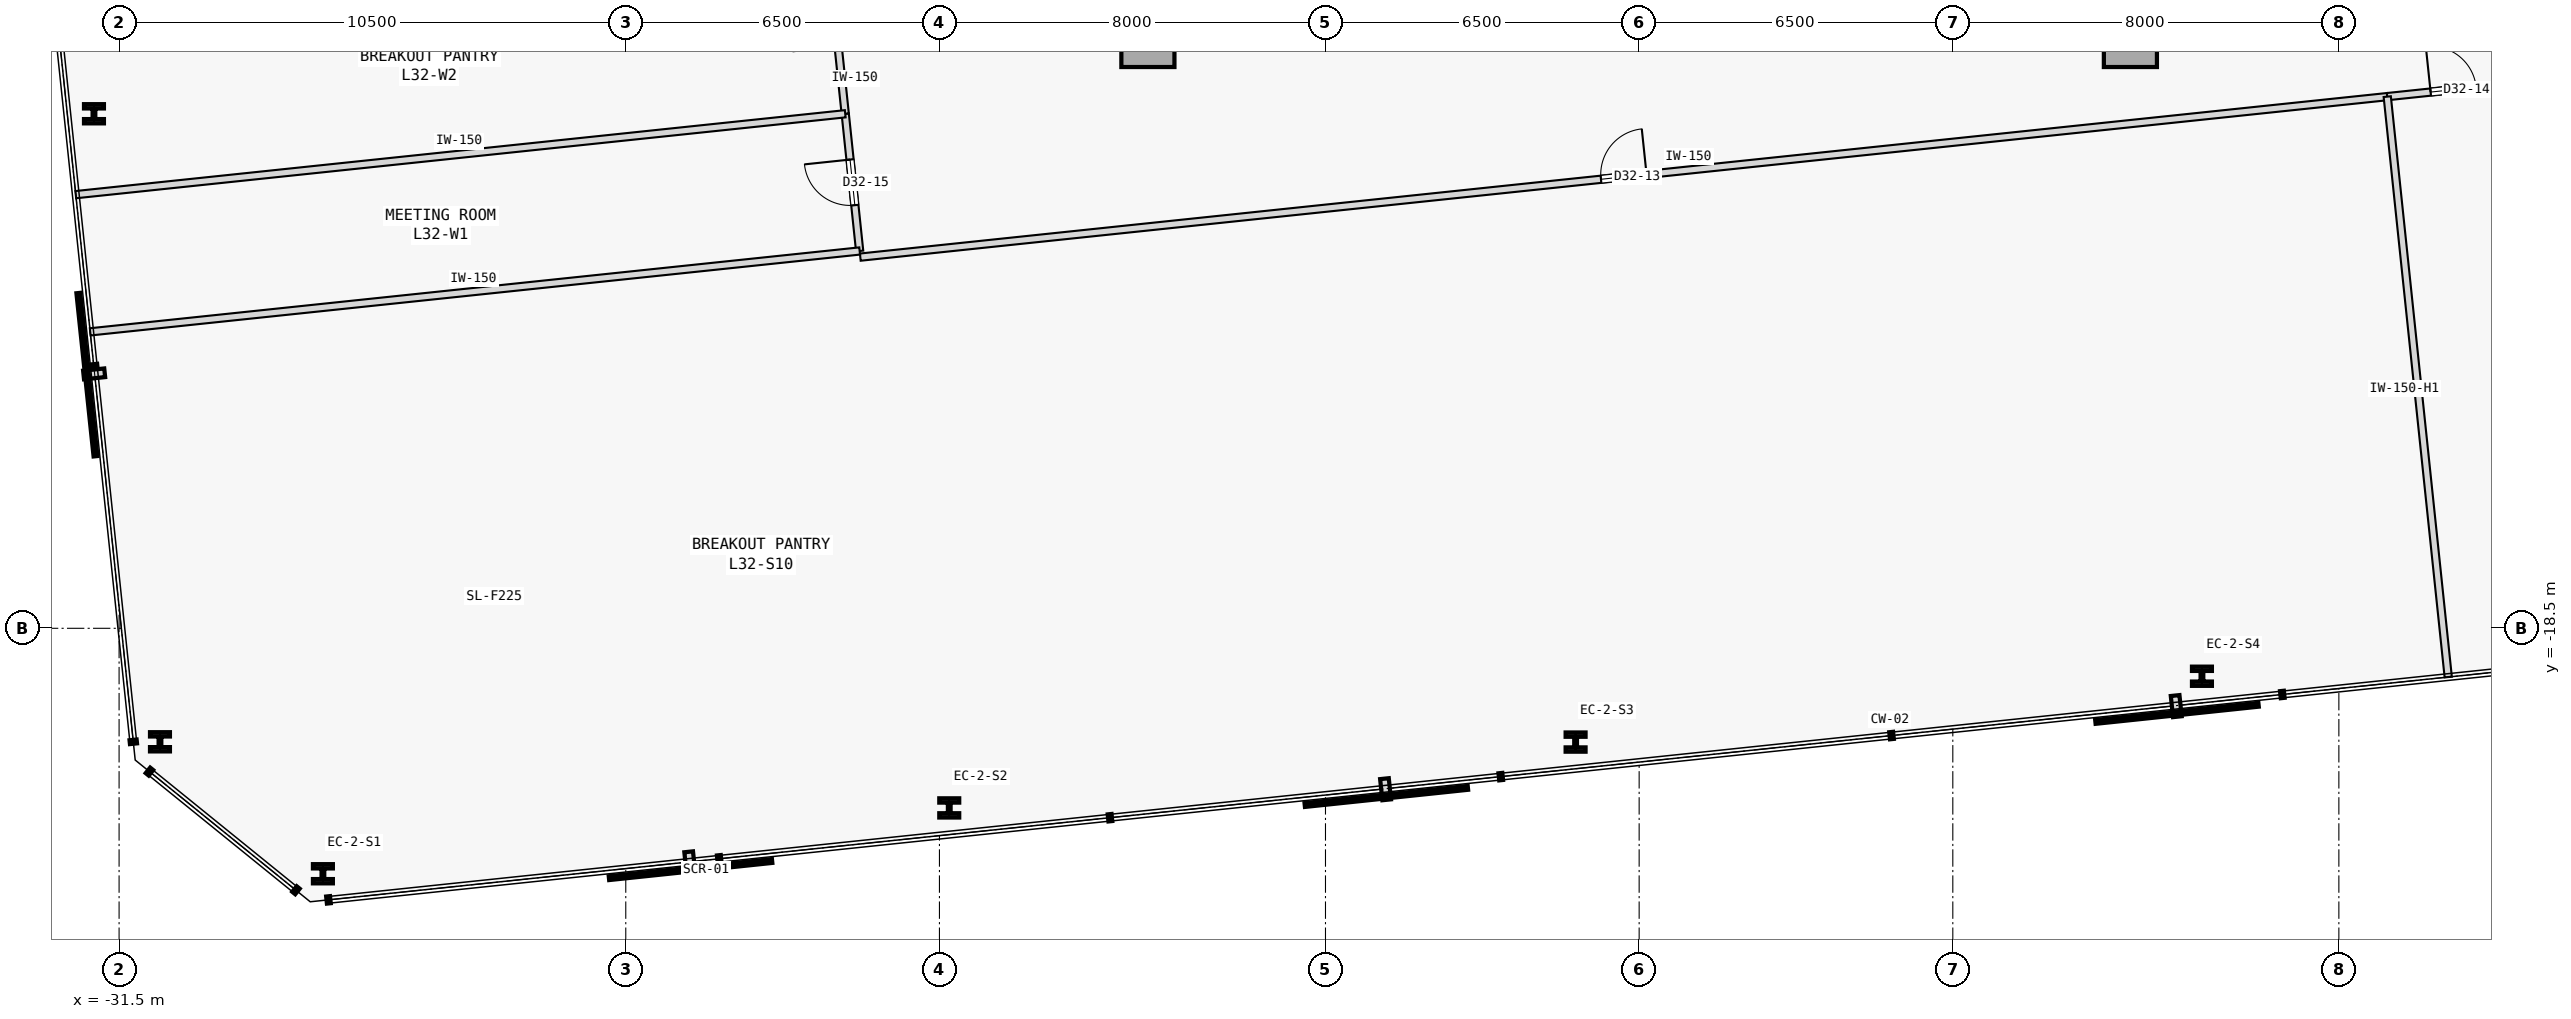
"""IFC4 building model, lengths in metres.
Left out: names, types, materials, properties, quantities, classifications, styles, units other than length and angle.
Written with IfcOpenShell. Run it as: python <this file> out.ifc"""

import sys

from ifc_helpers import new_model, si_unit, direction, frame, frame_2d, origin, origin_2d, place, context, subcontext, project, spatial, rectangle, i_section, extrude, element, fill, save


model = new_model("IFC4")
c1 = context("Model", 3, precision=1e-05, world=origin(), true_north=direction((0.0, 1.0)))
c2 = subcontext(c1, "Body", "Model", "MODEL_VIEW")
j1 = project(units=[si_unit("LENGTHUNIT", "METRE"), si_unit("PLANEANGLEUNIT", "RADIAN")], contexts=[c1])
p1 = place(None, origin())
s1 = spatial("IfcSite", under=j1, at=p1, CompositionType="ELEMENT")
p2 = place(p1, origin())
s2 = spatial("IfcBuilding", under=s1, at=p2, CompositionType="ELEMENT")
p3 = place(p2, frame((0.0, 0.0, 128.1)))
s3 = spatial("IfcBuildingStorey", under=s2, at=p3, CompositionType="ELEMENT", Elevation=128.1)
for number, where, z_axis, x_axis in (
    (1, (-10.18, -6.32, 0.0), (0.0, 0.0, 1.0), (1.0, 0.0, 0.0)),
    (2, (10.18, -6.32, 0.0), (0.0, 0.0, 1.0), (1.0, 0.0, 0.0)),
):
    element("IfcColumn", number, at=place(p3, frame(where, z_axis=z_axis, x_axis=x_axis)), inside=s3, PredefinedType="COLUMN", context=c2, shape_type="SweptSolid", body=[
        extrude(rectangle(XDim=1.1, YDim=1.1, at=origin_2d()), origin(), (0.0, 0.0, 1.0), 3.7),
    ])
for number, where, z_axis, x_axis in (
    (3, (-27.276, -23.586, 0.0), (0.0, 0.0, 1.0), (1.0, 0.0, 0.0)),
    (4, (-14.297, -22.222, 0.0), (0.0, 0.0, 1.0), (1.0, 0.0, 0.0)),
    (5, (-1.317, -20.858, 0.0), (0.0, 0.0, 1.0), (1.0, 0.0, 0.0)),
    (6, (11.663, -19.494, 0.0), (0.0, 0.0, 1.0), (1.0, 0.0, 0.0)),
    (7, (-32.021, -7.838, 0.0), (0.0, 0.0, 1.0), (1.0, 0.0, 0.0)),
    (8, (-30.653, -20.852, 0.0), (0.0, 0.0, 1.0), (1.0, 0.0, 0.0)),
):
    element("IfcColumn", number, at=place(p3, frame(where, z_axis=z_axis, x_axis=x_axis)), inside=s3, PredefinedType="COLUMN", context=c2, shape_type="SweptSolid", body=[
        extrude(i_section(OverallWidth=0.413, OverallDepth=0.398, WebThickness=0.056, FlangeThickness=0.089, FilletRadius=0.015, at=origin_2d()), origin(), (0.0, 0.0, 1.0), 3.7),
    ])
p4 = place(p3, frame((-16.14, -10.809, 0.0), z_axis=(0.0, 0.0, 1.0), x_axis=(0.994522174335, 0.104525809046, 0.0)))
e9 = element("IfcWall", 9, at=p4, inside=s3, PredefinedType="PARTITIONING", context=c2, shape_type="SweptSolid", body=[
    extrude(rectangle(XDim=31.817, YDim=0.15, at=frame_2d((15.908, 0.0))), origin(), (0.0, 0.0, 1.0), 3.475),
])
p5 = place(p4, frame((15.434, 0.0, 0.0)))
e10 = element("IfcOpeningElement", 10, at=p5, cuts=e9, PredefinedType="OPENING", context=c2, shape_type="SweptSolid", body=[
    extrude(rectangle(XDim=0.95, YDim=2.15, at=frame_2d((0.475, 1.075))), frame((0.0, 0.085, 0.0), z_axis=(0.0, -1.0, 0.0), x_axis=(1.0, 0.0, 0.0)), (0.0, 0.0, 1.0), 0.17),
])
p6 = place(p3, frame((15.503, -7.483, 0.0), z_axis=(0.0, 0.0, 1.0), x_axis=(0.994525813133, 0.104491181506, 0.0)))
e11 = element("IfcWall", 11, at=p6, inside=s3, PredefinedType="PARTITIONING", context=c2, shape_type="SweptSolid", body=[
    extrude(rectangle(XDim=2.757, YDim=0.15, at=frame_2d((1.378, 0.0))), origin(), (0.0, 0.0, 1.0), 3.475),
])
p7 = place(p6, frame((0.904, 0.0, 0.0)))
e12 = element("IfcOpeningElement", 12, at=p7, cuts=e11, PredefinedType="OPENING", context=c2, shape_type="SweptSolid", body=[
    extrude(rectangle(XDim=0.95, YDim=2.15, at=frame_2d((0.475, 1.075))), frame((0.0, 0.085, 0.0), z_axis=(0.0, -1.0, 0.0), x_axis=(1.0, 0.0, 0.0)), (0.0, 0.0, 1.0), 0.17),
])
p8 = place(p3, frame((-16.153, -10.682, 0.0), z_axis=(0.0, 0.0, 1.0), x_axis=(-0.104600331874, 0.994514339048, 0.0)))
e13 = element("IfcWall", 13, at=p8, inside=s3, PredefinedType="PARTITIONING", context=c2, shape_type="SweptSolid", body=[
    extrude(rectangle(XDim=2.859, YDim=0.15, at=frame_2d((1.43, 0.0))), origin(), (0.0, 0.0, 1.0), 3.475),
])
p9 = place(p8, frame((0.955, 0.0, 0.0)))
e14 = element("IfcOpeningElement", 14, at=p9, cuts=e13, PredefinedType="OPENING", context=c2, shape_type="SweptSolid", body=[
    extrude(rectangle(XDim=0.95, YDim=2.15, at=frame_2d((0.475, 1.075))), frame((0.0, 0.085, 0.0), z_axis=(0.0, -1.0, 0.0), x_axis=(1.0, 0.0, 0.0)), (0.0, 0.0, 1.0), 0.17),
])
p10 = place(p3, frame((-16.452, -7.838, 0.0), z_axis=(0.0, 0.0, 1.0), x_axis=(-0.104481590513, 0.994526820777, 0.0)))
e15 = element("IfcWall", 15, at=p10, inside=s3, PredefinedType="PARTITIONING", context=c2, shape_type="SweptSolid", body=[
    extrude(rectangle(XDim=3.753, YDim=0.15, at=frame_2d((1.876, 0.0))), origin(), (0.0, 0.0, 1.0), 3.475),
])
p11 = place(p10, frame((1.402, 0.0, 0.0)))
e16 = element("IfcOpeningElement", 16, at=p11, cuts=e15, PredefinedType="OPENING", context=c2, shape_type="SweptSolid", body=[
    extrude(rectangle(XDim=0.95, YDim=2.15, at=frame_2d((0.475, 1.075))), frame((0.0, 0.085, 0.0), z_axis=(0.0, -1.0, 0.0), x_axis=(1.0, 0.0, 0.0)), (0.0, 0.0, 1.0), 0.17),
])
p12 = place(p3, frame((18.231, -7.068, 0.0), z_axis=(0.0, 0.0, 1.0), x_axis=(-0.104536082083, 0.994521094569, 0.0)))
e17 = element("IfcWall", 17, at=p12, inside=s3, PredefinedType="PARTITIONING", context=c2, shape_type="SweptSolid", body=[
    extrude(rectangle(XDim=11.794, YDim=0.15, at=frame_2d((5.897, 0.0))), origin(), (0.0, 0.0, 1.0), 3.475),
])
p13 = place(p12, frame((5.422, 0.0, 0.0)))
e18 = element("IfcOpeningElement", 18, at=p13, cuts=e17, PredefinedType="OPENING", context=c2, shape_type="SweptSolid", body=[
    extrude(rectangle(XDim=0.95, YDim=2.15, at=frame_2d((0.475, 1.075))), frame((0.0, 0.085, 0.0), z_axis=(0.0, -1.0, 0.0), x_axis=(1.0, 0.0, 0.0)), (0.0, 0.0, 1.0), 0.17),
])
p14 = place(p3, frame((16.767, -19.51, 0.0), z_axis=(0.0, 0.0, 1.0), x_axis=(-0.104517685722, 0.994523028075, 0.0)))
e19 = element("IfcWall", 19, at=p14, inside=s3, PredefinedType="PARTITIONING", context=c2, shape_type="SweptSolid", body=[
    extrude(rectangle(XDim=12.093, YDim=0.15, at=frame_2d((6.046, 0.0))), origin(), (0.0, 0.0, 1.0), 3.025),
])
p15 = place(p3, frame((-32.099, -12.358, 0.0), z_axis=(0.0, 0.0, 1.0), x_axis=(0.994522794159, 0.104519911488, 0.0)))
e20 = element("IfcWall", 20, at=p15, inside=s3, PredefinedType="PARTITIONING", context=c2, shape_type="SweptSolid", body=[
    extrude(rectangle(XDim=16.033, YDim=0.15, at=frame_2d((8.017, 0.0))), origin(), (0.0, 0.0, 1.0), 3.475),
])
p16 = place(p3, frame((-32.397, -9.514, 0.0), z_axis=(0.0, 0.0, 1.0), x_axis=(0.994521044813, 0.104536555445, 0.0)))
e21 = element("IfcWall", 21, at=p16, inside=s3, PredefinedType="PARTITIONING", context=c2, shape_type="SweptSolid", body=[
    extrude(rectangle(XDim=16.033, YDim=0.15, at=frame_2d((8.017, 0.0))), origin(), (0.0, 0.0, 1.0), 3.475),
])
p17 = place(p5, origin())
e22 = element("IfcDoor", 22, at=p17, inside=s3, OperationType="SINGLE_SWING_RIGHT", PredefinedType="DOOR", context=c2, shape_type="SweptSolid", body=[
    extrude(rectangle(XDim=0.95, YDim=2.15, at=frame_2d((0.475, 1.075))), frame((0.0, 0.025, 0.0), z_axis=(0.0, -1.0, 0.0), x_axis=(1.0, 0.0, 0.0)), (0.0, 0.0, 1.0), 0.05),
])
fill(e10, e22)
p18 = place(p7, origin())
e23 = element("IfcDoor", 23, at=p18, inside=s3, OperationType="SINGLE_SWING_LEFT", PredefinedType="DOOR", context=c2, shape_type="SweptSolid", body=[
    extrude(rectangle(XDim=0.95, YDim=2.15, at=frame_2d((0.475, 1.075))), frame((0.0, 0.025, 0.0), z_axis=(0.0, -1.0, 0.0), x_axis=(1.0, 0.0, 0.0)), (0.0, 0.0, 1.0), 0.05),
])
fill(e12, e23)
p19 = place(p9, origin())
e24 = element("IfcDoor", 24, at=p19, inside=s3, OperationType="SINGLE_SWING_RIGHT", PredefinedType="DOOR", context=c2, shape_type="SweptSolid", body=[
    extrude(rectangle(XDim=0.95, YDim=2.15, at=frame_2d((0.475, 1.075))), frame((0.0, 0.025, 0.0), z_axis=(0.0, -1.0, 0.0), x_axis=(1.0, 0.0, 0.0)), (0.0, 0.0, 1.0), 0.05),
])
fill(e14, e24)
save(model, sys.argv[1])
